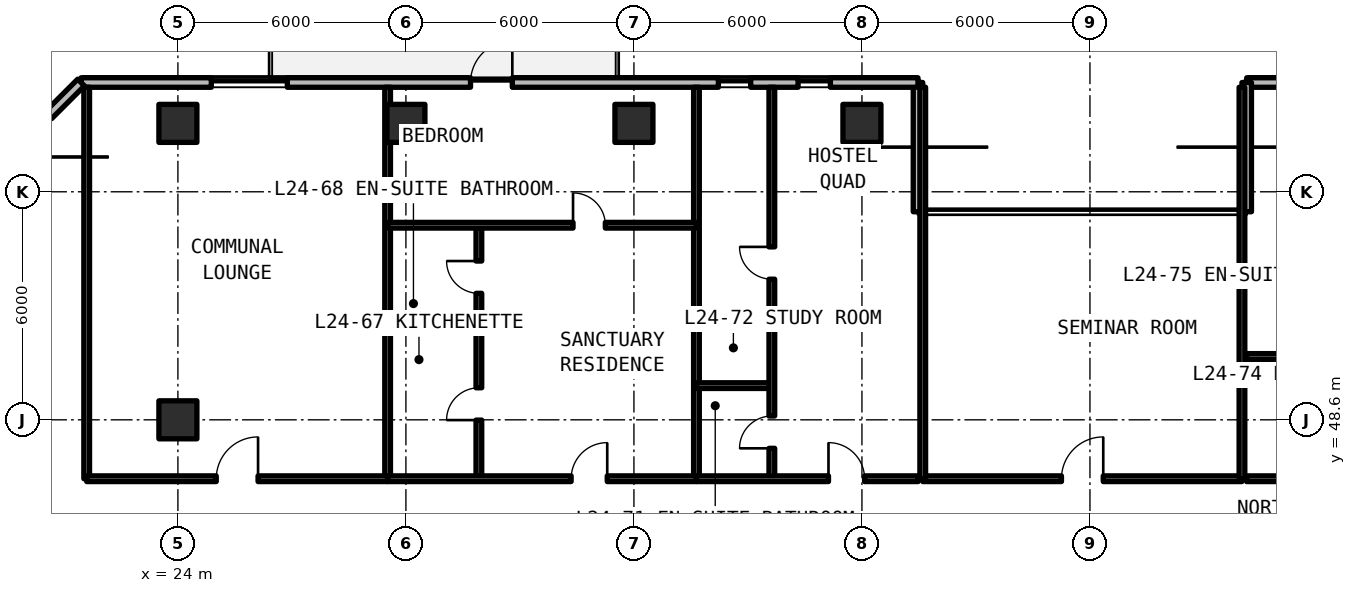
"""IFC4 building model, lengths in metres.
Left out: names, types, materials, properties, quantities, classifications, styles, units other than length and angle.
Written with IfcOpenShell. Run it as: python <this file> out.ifc"""

import sys

from ifc_helpers import new_model, si_unit, direction, frame, frame_2d, origin, origin_2d, place, context, subcontext, project, spatial, rectangle, extrude, element, fill, save


model = new_model("IFC4")
c1 = context("Model", 3, precision=1e-05, world=origin(), true_north=direction((0.0, 1.0)))
c2 = subcontext(c1, "Body", "Model", "MODEL_VIEW")
j1 = project(units=[si_unit("LENGTHUNIT", "METRE"), si_unit("PLANEANGLEUNIT", "RADIAN")], contexts=[c1])
p1 = place(None, origin())
s1 = spatial("IfcSite", under=j1, at=p1, CompositionType="ELEMENT")
p2 = place(p1, origin())
s2 = spatial("IfcBuilding", under=s1, at=p2, CompositionType="ELEMENT")
p3 = place(p2, frame((0.0, 0.0, 88.77)))
s3 = spatial("IfcBuildingStorey", under=s2, at=p3, CompositionType="ELEMENT", Elevation=88.77)
for number, where, z_axis, x_axis in (
    (1, (24.0, 48.6, 0.0), (0.0, 0.0, 1.0), (1.0, 0.0, 0.0)),
    (2, (24.0, 56.4, 0.0), (0.0, 0.0, 1.0), (1.0, 0.0, 0.0)),
    (3, (30.0, 56.4, 0.0), (0.0, 0.0, 1.0), (1.0, 0.0, 0.0)),
    (4, (36.0, 56.4, 0.0), (0.0, 0.0, 1.0), (1.0, 0.0, 0.0)),
    (5, (42.0, 56.4, 0.0), (0.0, 0.0, 1.0), (1.0, 0.0, 0.0)),
):
    element("IfcColumn", number, at=place(p3, frame(where, z_axis=z_axis, x_axis=x_axis)), inside=s3, PredefinedType="COLUMN", context=c2, shape_type="SweptSolid", body=[
        extrude(rectangle(XDim=1.0, YDim=1.0, at=origin_2d()), origin(), (0.0, 0.0, 1.0), 3.3),
    ])
p4 = place(p3, frame((96.148, 57.475, 0.0), z_axis=(0.0, 0.0, 1.0), x_axis=(-1.0, 0.0, 0.0)))
e6 = element("IfcWall", 6, at=p4, inside=s3, PredefinedType="SOLIDWALL", context=c2, shape_type="SweptSolid", body=[
    extrude(rectangle(XDim=44.023, YDim=0.25, at=frame_2d((22.012, 0.0))), origin(), (0.0, 0.0, 1.0), 3.08),
])
p5 = place(p4, frame((27.298, 0.0, 0.0)))
e7 = element("IfcOpeningElement", 7, at=p5, cuts=e6, PredefinedType="OPENING", context=c2, shape_type="SweptSolid", body=[
    extrude(rectangle(XDim=1.1, YDim=2.15, at=frame_2d((0.55, 1.075))), frame((0.0, 0.135, 0.0), z_axis=(0.0, -1.0, 0.0), x_axis=(1.0, 0.0, 0.0)), (0.0, 0.0, 1.0), 0.27),
])
p6 = place(p4, frame((19.948, 0.0, 0.0)))
e8 = element("IfcOpeningElement", 8, at=p6, cuts=e6, PredefinedType="OPENING", context=c2, shape_type="SweptSolid", body=[
    extrude(rectangle(XDim=1.1, YDim=2.15, at=frame_2d((0.55, 1.075))), frame((0.0, 0.135, 0.0), z_axis=(0.0, -1.0, 0.0), x_axis=(1.0, 0.0, 0.0)), (0.0, 0.0, 1.0), 0.27),
])
p7 = place(p4, frame((8.098, 0.0, 0.0)))
e9 = element("IfcOpeningElement", 9, at=p7, cuts=e6, PredefinedType="OPENING", context=c2, shape_type="SweptSolid", body=[
    extrude(rectangle(XDim=1.1, YDim=2.15, at=frame_2d((0.55, 1.075))), frame((0.0, 0.135, 0.0), z_axis=(0.0, -1.0, 0.0), x_axis=(1.0, 0.0, 0.0)), (0.0, 0.0, 1.0), 0.27),
])
p8 = place(p4, frame((39.336, 0.0, 0.78)))
e10 = element("IfcOpeningElement", 10, at=p8, cuts=e6, PredefinedType="OPENING", context=c2, shape_type="SweptSolid", body=[
    extrude(rectangle(XDim=2.0, YDim=1.66, at=frame_2d((1.0, 0.83))), frame((0.0, 0.135, 0.0), z_axis=(0.0, -1.0, 0.0), x_axis=(1.0, 0.0, 0.0)), (0.0, 0.0, 1.0), 0.27),
])
p9 = place(p4, frame((33.345, 0.0, 0.78)))
e11 = element("IfcOpeningElement", 11, at=p9, cuts=e6, PredefinedType="OPENING", context=c2, shape_type="SweptSolid", body=[
    extrude(rectangle(XDim=2.0, YDim=1.66, at=frame_2d((1.0, 0.83))), frame((0.0, 0.135, 0.0), z_axis=(0.0, -1.0, 0.0), x_axis=(1.0, 0.0, 0.0)), (0.0, 0.0, 1.0), 0.27),
])
p10 = place(p4, frame((13.044, 0.0, 0.78)))
e12 = element("IfcOpeningElement", 12, at=p10, cuts=e6, PredefinedType="OPENING", context=c2, shape_type="SweptSolid", body=[
    extrude(rectangle(XDim=1.4, YDim=1.65, at=frame_2d((0.7, 0.825))), frame((0.0, 0.135, 0.0), z_axis=(0.0, -1.0, 0.0), x_axis=(1.0, 0.0, 0.0)), (0.0, 0.0, 1.0), 0.27),
])
p11 = place(p4, frame((2.871, 0.0, 0.78)))
e13 = element("IfcOpeningElement", 13, at=p11, cuts=e6, PredefinedType="OPENING", context=c2, shape_type="SweptSolid", body=[
    extrude(rectangle(XDim=2.0, YDim=1.66, at=frame_2d((1.0, 0.83))), frame((0.0, 0.135, 0.0), z_axis=(0.0, -1.0, 0.0), x_axis=(1.0, 0.0, 0.0)), (0.0, 0.0, 1.0), 0.27),
])
for number, where, z_axis, x_axis in (
    (14, (52.125, 57.475, 0.0), (0.0, 0.0, 1.0), (0.0, -1.0, 0.0)),
    (15, (43.475, 54.075, 0.0), (0.0, 0.0, 1.0), (0.0, 1.0, 0.0)),
):
    element("IfcWall", number, at=place(p3, frame(where, z_axis=z_axis, x_axis=x_axis)), inside=s3, PredefinedType="SOLIDWALL", context=c2, shape_type="SweptSolid", body=[
        extrude(rectangle(XDim=3.4, YDim=0.25, at=frame_2d((1.7, 0.0))), origin(), (0.0, 0.0, 1.0), 3.08),
    ])
p12 = place(p3, frame((43.475, 57.475, 0.0), z_axis=(0.0, 0.0, 1.0), x_axis=(-1.0, 0.0, 0.0)))
e16 = element("IfcWall", 16, at=p12, inside=s3, PredefinedType="SOLIDWALL", context=c2, shape_type="SweptSolid", body=[
    extrude(rectangle(XDim=22.023, YDim=0.25, at=frame_2d((11.012, 0.0))), origin(), (0.0, 0.0, 1.0), 3.08),
])
p13 = place(p12, frame((10.675, 0.0, 0.0)))
e17 = element("IfcOpeningElement", 17, at=p13, cuts=e16, PredefinedType="OPENING", context=c2, shape_type="SweptSolid", body=[
    extrude(rectangle(XDim=1.1, YDim=2.15, at=frame_2d((0.55, 1.075))), frame((0.0, 0.135, 0.0), z_axis=(0.0, -1.0, 0.0), x_axis=(1.0, 0.0, 0.0)), (0.0, 0.0, 1.0), 0.27),
])
p14 = place(p12, frame((16.596, 0.0, 0.78)))
e18 = element("IfcOpeningElement", 18, at=p14, cuts=e16, PredefinedType="OPENING", context=c2, shape_type="SweptSolid", body=[
    extrude(rectangle(XDim=2.0, YDim=1.66, at=frame_2d((1.0, 0.83))), frame((0.0, 0.135, 0.0), z_axis=(0.0, -1.0, 0.0), x_axis=(1.0, 0.0, 0.0)), (0.0, 0.0, 1.0), 0.27),
])
p15 = place(p12, frame((4.403, 0.0, 0.78)))
e19 = element("IfcOpeningElement", 19, at=p15, cuts=e16, PredefinedType="OPENING", context=c2, shape_type="SweptSolid", body=[
    extrude(rectangle(XDim=0.85, YDim=1.65, at=frame_2d((0.425, 0.825))), frame((0.0, 0.135, 0.0), z_axis=(0.0, -1.0, 0.0), x_axis=(1.0, 0.0, 0.0)), (0.0, 0.0, 1.0), 0.27),
])
p16 = place(p12, frame((2.305, 0.0, 0.78)))
e20 = element("IfcOpeningElement", 20, at=p16, cuts=e16, PredefinedType="OPENING", context=c2, shape_type="SweptSolid", body=[
    extrude(rectangle(XDim=0.85, YDim=1.65, at=frame_2d((0.425, 0.825))), frame((0.0, 0.135, 0.0), z_axis=(0.0, -1.0, 0.0), x_axis=(1.0, 0.0, 0.0)), (0.0, 0.0, 1.0), 0.27),
])
p17 = place(p3, frame((21.452, 57.475, 0.0), z_axis=(0.0, 0.0, 1.0), x_axis=(-0.707106781187, -0.707106781187, 0.0)))
e21 = element("IfcWall", 21, at=p17, inside=s3, PredefinedType="SOLIDWALL", context=c2, shape_type="SweptSolid", body=[
    extrude(rectangle(XDim=5.836, YDim=0.25, at=frame_2d((2.918, 0.0))), origin(), (0.0, 0.0, 1.0), 3.08),
])
p18 = place(p17, frame((1.218, 0.0, 0.78)))
e22 = element("IfcOpeningElement", 22, at=p18, cuts=e21, PredefinedType="OPENING", context=c2, shape_type="SweptSolid", body=[
    extrude(rectangle(XDim=3.4, YDim=1.66, at=frame_2d((1.7, 0.83))), frame((0.0, 0.135, 0.0), z_axis=(0.0, -1.0, 0.0), x_axis=(1.0, 0.0, 0.0)), (0.0, 0.0, 1.0), 0.27),
])
p19 = place(p3, frame((43.6, 47.05, 0.0), z_axis=(0.0, 0.0, 1.0), x_axis=(1.0, 0.0, 0.0)))
e23 = element("IfcWall", 23, at=p19, inside=s3, PredefinedType="SOLIDWALL", context=c2, shape_type="SweptSolid", body=[
    extrude(rectangle(XDim=8.4, YDim=0.15, at=frame_2d((4.2, 0.0))), origin(), (0.0, 0.0, 1.0), 2.35),
])
p20 = place(p19, frame((3.65, 0.0, 0.0)))
e24 = element("IfcOpeningElement", 24, at=p20, cuts=e23, PredefinedType="OPENING", context=c2, shape_type="SweptSolid", body=[
    extrude(rectangle(XDim=1.1, YDim=2.15, at=frame_2d((0.55, 1.075))), frame((0.0, 0.085, 0.0), z_axis=(0.0, -1.0, 0.0), x_axis=(1.0, 0.0, 0.0)), (0.0, 0.0, 1.0), 0.17),
])
for number, where, z_axis, x_axis in (
    (25, (43.6, 47.05, 0.0), (0.0, 0.0, 1.0), (0.0, 1.0, 0.0)),
    (26, (52.0, 47.05, 0.0), (0.0, 0.0, 1.0), (0.0, 1.0, 0.0)),
    (27, (21.6, 47.05, 0.0), (0.0, 0.0, 1.0), (0.0, 1.0, 0.0)),
    (28, (29.519, 47.05, 0.0), (0.0, 0.0, 1.0), (0.0, 1.0, 0.0)),
):
    element("IfcWall", number, at=place(p3, frame(where, z_axis=z_axis, x_axis=x_axis)), inside=s3, PredefinedType="SOLIDWALL", context=c2, shape_type="SweptSolid", body=[
        extrude(rectangle(XDim=10.3, YDim=0.15, at=frame_2d((5.15, 0.0))), origin(), (0.0, 0.0, 1.0), 2.35),
    ])
p21 = place(p3, frame((21.6, 47.05, 0.0), z_axis=(0.0, 0.0, 1.0), x_axis=(1.0, 0.0, 0.0)))
e29 = element("IfcWall", 29, at=p21, inside=s3, PredefinedType="SOLIDWALL", context=c2, shape_type="SweptSolid", body=[
    extrude(rectangle(XDim=7.918, YDim=0.15, at=frame_2d((3.959, 0.0))), origin(), (0.0, 0.0, 1.0), 2.35),
])
p22 = place(p21, frame((3.409, 0.0, 0.0)))
e30 = element("IfcOpeningElement", 30, at=p22, cuts=e29, PredefinedType="OPENING", context=c2, shape_type="SweptSolid", body=[
    extrude(rectangle(XDim=1.1, YDim=2.15, at=frame_2d((0.55, 1.075))), frame((0.0, 0.085, 0.0), z_axis=(0.0, -1.0, 0.0), x_axis=(1.0, 0.0, 0.0)), (0.0, 0.0, 1.0), 0.17),
])
p23 = place(p3, frame((37.646, 47.05, 0.0), z_axis=(0.0, 0.0, 1.0), x_axis=(0.0, 1.0, 0.0)))
e31 = element("IfcWall", 31, at=p23, inside=s3, PredefinedType="SOLIDWALL", context=c2, shape_type="SweptSolid", body=[
    extrude(rectangle(XDim=10.3, YDim=0.15, at=frame_2d((5.15, 0.0))), origin(), (0.0, 0.0, 1.0), 2.35),
])
p24 = place(p3, frame((29.519, 50.985, 0.0), z_axis=(0.0, 0.0, 1.0), x_axis=(1.0, 0.0, 0.0)))
e32 = element("IfcWall", 32, at=p24, inside=s3, PredefinedType="PARTITIONING", context=c2, shape_type="SweptSolid", body=[
    extrude(rectangle(XDim=2.401, YDim=0.15, at=frame_2d((1.201, 0.0))), origin(), (0.0, 0.0, 1.0), 2.35),
])
p25 = place(p3, frame((31.92, 47.05, 0.0), z_axis=(0.0, 0.0, 1.0), x_axis=(0.0, 1.0, 0.0)))
e33 = element("IfcWall", 33, at=p25, inside=s3, PredefinedType="PARTITIONING", context=c2, shape_type="SweptSolid", body=[
    extrude(rectangle(XDim=6.67, YDim=0.15, at=frame_2d((3.335, 0.0))), origin(), (0.0, 0.0, 1.0), 2.35),
])
p26 = place(p25, frame((1.543, 0.0, 0.0)))
e34 = element("IfcOpeningElement", 34, at=p26, cuts=e33, PredefinedType="OPENING", context=c2, shape_type="SweptSolid", body=[
    extrude(rectangle(XDim=0.85, YDim=2.1, at=frame_2d((0.425, 1.05))), frame((0.0, 0.085, 0.0), z_axis=(0.0, -1.0, 0.0), x_axis=(1.0, 0.0, 0.0)), (0.0, 0.0, 1.0), 0.17),
])
p27 = place(p25, frame((4.878, 0.0, 0.0)))
e35 = element("IfcOpeningElement", 35, at=p27, cuts=e33, PredefinedType="OPENING", context=c2, shape_type="SweptSolid", body=[
    extrude(rectangle(XDim=0.85, YDim=2.1, at=frame_2d((0.425, 1.05))), frame((0.0, 0.085, 0.0), z_axis=(0.0, -1.0, 0.0), x_axis=(1.0, 0.0, 0.0)), (0.0, 0.0, 1.0), 0.17),
])
p28 = place(p3, frame((29.519, 53.72, 0.0), z_axis=(0.0, 0.0, 1.0), x_axis=(1.0, 0.0, 0.0)))
e36 = element("IfcWall", 36, at=p28, inside=s3, PredefinedType="PARTITIONING", context=c2, shape_type="SweptSolid", body=[
    extrude(rectangle(XDim=8.127, YDim=0.15, at=frame_2d((4.063, 0.0))), origin(), (0.0, 0.0, 1.0), 2.35),
])
p29 = place(p28, frame((4.879, 0.0, 0.0)))
e37 = element("IfcOpeningElement", 37, at=p29, cuts=e36, PredefinedType="OPENING", context=c2, shape_type="SweptSolid", body=[
    extrude(rectangle(XDim=0.85, YDim=2.1, at=frame_2d((0.425, 1.05))), frame((0.0, 0.085, 0.0), z_axis=(0.0, -1.0, 0.0), x_axis=(1.0, 0.0, 0.0)), (0.0, 0.0, 1.0), 0.17),
])
p30 = place(p3, frame((29.519, 47.05, 0.0), z_axis=(0.0, 0.0, 1.0), x_axis=(1.0, 0.0, 0.0)))
e38 = element("IfcWall", 38, at=p30, inside=s3, PredefinedType="SOLIDWALL", context=c2, shape_type="SweptSolid", body=[
    extrude(rectangle(XDim=8.127, YDim=0.15, at=frame_2d((4.063, 0.0))), origin(), (0.0, 0.0, 1.0), 2.35),
])
p31 = place(p30, frame((4.829, 0.0, 0.0)))
e39 = element("IfcOpeningElement", 39, at=p31, cuts=e38, PredefinedType="OPENING", context=c2, shape_type="SweptSolid", body=[
    extrude(rectangle(XDim=0.95, YDim=2.15, at=frame_2d((0.475, 1.075))), frame((0.0, 0.085, 0.0), z_axis=(0.0, -1.0, 0.0), x_axis=(1.0, 0.0, 0.0)), (0.0, 0.0, 1.0), 0.17),
])
p32 = place(p3, frame((37.646, 49.5, 0.0), z_axis=(0.0, 0.0, 1.0), x_axis=(1.0, 0.0, 0.0)))
e40 = element("IfcWall", 40, at=p32, inside=s3, PredefinedType="PARTITIONING", context=c2, shape_type="SweptSolid", body=[
    extrude(rectangle(XDim=1.984, YDim=0.15, at=frame_2d((0.992, 0.0))), origin(), (0.0, 0.0, 1.0), 2.35),
])
p33 = place(p3, frame((39.629, 47.05, 0.0), z_axis=(0.0, 0.0, 1.0), x_axis=(0.0, 1.0, 0.0)))
e41 = element("IfcWall", 41, at=p33, inside=s3, PredefinedType="PARTITIONING", context=c2, shape_type="SweptSolid", body=[
    extrude(rectangle(XDim=10.3, YDim=0.15, at=frame_2d((5.15, 0.0))), origin(), (0.0, 0.0, 1.0), 2.35),
])
p34 = place(p33, frame((0.8, 0.0, 0.0)))
e42 = element("IfcOpeningElement", 42, at=p34, cuts=e41, PredefinedType="OPENING", context=c2, shape_type="SweptSolid", body=[
    extrude(rectangle(XDim=0.85, YDim=2.1, at=frame_2d((0.425, 1.05))), frame((0.0, 0.085, 0.0), z_axis=(0.0, -1.0, 0.0), x_axis=(1.0, 0.0, 0.0)), (0.0, 0.0, 1.0), 0.17),
])
p35 = place(p33, frame((5.25, 0.0, 0.0)))
e43 = element("IfcOpeningElement", 43, at=p35, cuts=e41, PredefinedType="OPENING", context=c2, shape_type="SweptSolid", body=[
    extrude(rectangle(XDim=0.85, YDim=2.1, at=frame_2d((0.425, 1.05))), frame((0.0, 0.085, 0.0), z_axis=(0.0, -1.0, 0.0), x_axis=(1.0, 0.0, 0.0)), (0.0, 0.0, 1.0), 0.17),
])
p36 = place(p3, frame((37.646, 47.05, 0.0), z_axis=(0.0, 0.0, 1.0), x_axis=(1.0, 0.0, 0.0)))
e44 = element("IfcWall", 44, at=p36, inside=s3, PredefinedType="SOLIDWALL", context=c2, shape_type="SweptSolid", body=[
    extrude(rectangle(XDim=5.834, YDim=0.15, at=frame_2d((2.917, 0.0))), origin(), (0.0, 0.0, 1.0), 2.35),
])
p37 = place(p36, frame((3.474, 0.0, 0.0)))
e45 = element("IfcOpeningElement", 45, at=p37, cuts=e44, PredefinedType="OPENING", context=c2, shape_type="SweptSolid", body=[
    extrude(rectangle(XDim=0.95, YDim=2.15, at=frame_2d((0.475, 1.075))), frame((0.0, 0.085, 0.0), z_axis=(0.0, -1.0, 0.0), x_axis=(1.0, 0.0, 0.0)), (0.0, 0.0, 1.0), 0.17),
])
p38 = place(p3, frame((52.12, 50.267, 0.0), z_axis=(0.0, 0.0, 1.0), x_axis=(1.0, 0.0, 0.0)))
e46 = element("IfcWall", 46, at=p38, inside=s3, PredefinedType="PARTITIONING", context=c2, shape_type="SweptSolid", body=[
    extrude(rectangle(XDim=3.8, YDim=0.15, at=frame_2d((1.9, 0.0))), origin(), (0.0, 0.0, 1.0), 2.35),
])
p39 = place(p3, frame((52.12, 52.502, 0.0), z_axis=(0.0, 0.0, 1.0), x_axis=(1.0, 0.0, 0.0)))
e47 = element("IfcWall", 47, at=p39, inside=s3, PredefinedType="PARTITIONING", context=c2, shape_type="SweptSolid", body=[
    extrude(rectangle(XDim=11.701, YDim=0.15, at=frame_2d((5.851, 0.0))), origin(), (0.0, 0.0, 1.0), 2.35),
])
p40 = place(p39, frame((4.517, 0.0, 0.0)))
e48 = element("IfcOpeningElement", 48, at=p40, cuts=e47, PredefinedType="OPENING", context=c2, shape_type="SweptSolid", body=[
    extrude(rectangle(XDim=0.85, YDim=2.1, at=frame_2d((0.425, 1.05))), frame((0.0, 0.085, 0.0), z_axis=(0.0, -1.0, 0.0), x_axis=(1.0, 0.0, 0.0)), (0.0, 0.0, 1.0), 0.17),
])
p41 = place(p39, frame((8.468, 0.0, 0.0)))
e49 = element("IfcOpeningElement", 49, at=p41, cuts=e47, PredefinedType="OPENING", context=c2, shape_type="SweptSolid", body=[
    extrude(rectangle(XDim=0.85, YDim=2.1, at=frame_2d((0.425, 1.05))), frame((0.0, 0.085, 0.0), z_axis=(0.0, -1.0, 0.0), x_axis=(1.0, 0.0, 0.0)), (0.0, 0.0, 1.0), 0.17),
])
p42 = place(p3, frame((52.12, 47.05, 0.0), z_axis=(0.0, 0.0, 1.0), x_axis=(1.0, 0.0, 0.0)))
e50 = element("IfcWall", 50, at=p42, inside=s3, PredefinedType="SOLIDWALL", context=c2, shape_type="SweptSolid", body=[
    extrude(rectangle(XDim=11.701, YDim=0.15, at=frame_2d((5.851, 0.0))), origin(), (0.0, 0.0, 1.0), 2.35),
])
p43 = place(p42, frame((7.316, 0.0, 0.0)))
e51 = element("IfcOpeningElement", 51, at=p43, cuts=e50, PredefinedType="OPENING", context=c2, shape_type="SweptSolid", body=[
    extrude(rectangle(XDim=0.95, YDim=2.15, at=frame_2d((0.475, 1.075))), frame((0.0, 0.085, 0.0), z_axis=(0.0, -1.0, 0.0), x_axis=(1.0, 0.0, 0.0)), (0.0, 0.0, 1.0), 0.17),
])
p44 = place(p13, frame((1.1, 0.0, 0.0), z_axis=(0.0, 0.0, 1.0), x_axis=(-1.0, 0.0, 0.0)))
e52 = element("IfcDoor", 52, at=p44, inside=s3, OperationType="SINGLE_SWING_RIGHT", PredefinedType="DOOR", context=c2, shape_type="SweptSolid", body=[
    extrude(rectangle(XDim=1.1, YDim=2.15, at=frame_2d((0.55, 1.075))), frame((0.0, 0.025, 0.0), z_axis=(0.0, -1.0, 0.0), x_axis=(1.0, 0.0, 0.0)), (0.0, 0.0, 1.0), 0.05),
])
fill(e17, e52)
p45 = place(p14, origin())
e53 = element("IfcWindow", 53, at=p45, inside=s3, PartitioningType="SINGLE_PANEL", PredefinedType="WINDOW", context=c2, shape_type="SweptSolid", body=[
    extrude(rectangle(XDim=2.0, YDim=1.66, at=frame_2d((1.0, 0.83))), frame((0.0, 0.03, 0.0), z_axis=(0.0, -1.0, 0.0), x_axis=(1.0, 0.0, 0.0)), (0.0, 0.0, 1.0), 0.06),
])
fill(e18, e53)
p46 = place(p15, origin())
e54 = element("IfcWindow", 54, at=p46, inside=s3, PartitioningType="SINGLE_PANEL", PredefinedType="WINDOW", context=c2, shape_type="SweptSolid", body=[
    extrude(rectangle(XDim=0.85, YDim=1.65, at=frame_2d((0.425, 0.825))), frame((0.0, 0.03, 0.0), z_axis=(0.0, -1.0, 0.0), x_axis=(1.0, 0.0, 0.0)), (0.0, 0.0, 1.0), 0.06),
])
fill(e19, e54)
p47 = place(p16, origin())
e55 = element("IfcWindow", 55, at=p47, inside=s3, PartitioningType="SINGLE_PANEL", PredefinedType="WINDOW", context=c2, shape_type="SweptSolid", body=[
    extrude(rectangle(XDim=0.85, YDim=1.65, at=frame_2d((0.425, 0.825))), frame((0.0, 0.03, 0.0), z_axis=(0.0, -1.0, 0.0), x_axis=(1.0, 0.0, 0.0)), (0.0, 0.0, 1.0), 0.06),
])
fill(e20, e55)
p48 = place(p20, origin())
e56 = element("IfcDoor", 56, at=p48, inside=s3, OperationType="SINGLE_SWING_RIGHT", PredefinedType="DOOR", context=c2, shape_type="SweptSolid", body=[
    extrude(rectangle(XDim=1.1, YDim=2.15, at=frame_2d((0.55, 1.075))), frame((0.0, 0.025, 0.0), z_axis=(0.0, -1.0, 0.0), x_axis=(1.0, 0.0, 0.0)), (0.0, 0.0, 1.0), 0.05),
])
fill(e24, e56)
p49 = place(p22, origin())
e57 = element("IfcDoor", 57, at=p49, inside=s3, OperationType="SINGLE_SWING_RIGHT", PredefinedType="DOOR", context=c2, shape_type="SweptSolid", body=[
    extrude(rectangle(XDim=1.1, YDim=2.15, at=frame_2d((0.55, 1.075))), frame((0.0, 0.025, 0.0), z_axis=(0.0, -1.0, 0.0), x_axis=(1.0, 0.0, 0.0)), (0.0, 0.0, 1.0), 0.05),
])
fill(e30, e57)
p50 = place(p26, origin())
e58 = element("IfcDoor", 58, at=p50, inside=s3, OperationType="SINGLE_SWING_LEFT", PredefinedType="DOOR", context=c2, shape_type="SweptSolid", body=[
    extrude(rectangle(XDim=0.85, YDim=2.1, at=frame_2d((0.425, 1.05))), frame((0.0, 0.025, 0.0), z_axis=(0.0, -1.0, 0.0), x_axis=(1.0, 0.0, 0.0)), (0.0, 0.0, 1.0), 0.05),
])
fill(e34, e58)
p51 = place(p27, origin())
e59 = element("IfcDoor", 59, at=p51, inside=s3, OperationType="SINGLE_SWING_RIGHT", PredefinedType="DOOR", context=c2, shape_type="SweptSolid", body=[
    extrude(rectangle(XDim=0.85, YDim=2.1, at=frame_2d((0.425, 1.05))), frame((0.0, 0.025, 0.0), z_axis=(0.0, -1.0, 0.0), x_axis=(1.0, 0.0, 0.0)), (0.0, 0.0, 1.0), 0.05),
])
fill(e35, e59)
p52 = place(p29, origin())
e60 = element("IfcDoor", 60, at=p52, inside=s3, OperationType="SINGLE_SWING_LEFT", PredefinedType="DOOR", context=c2, shape_type="SweptSolid", body=[
    extrude(rectangle(XDim=0.85, YDim=2.1, at=frame_2d((0.425, 1.05))), frame((0.0, 0.025, 0.0), z_axis=(0.0, -1.0, 0.0), x_axis=(1.0, 0.0, 0.0)), (0.0, 0.0, 1.0), 0.05),
])
fill(e37, e60)
p53 = place(p31, origin())
e61 = element("IfcDoor", 61, at=p53, inside=s3, OperationType="SINGLE_SWING_RIGHT", PredefinedType="DOOR", context=c2, shape_type="SweptSolid", body=[
    extrude(rectangle(XDim=0.95, YDim=2.15, at=frame_2d((0.475, 1.075))), frame((0.0, 0.025, 0.0), z_axis=(0.0, -1.0, 0.0), x_axis=(1.0, 0.0, 0.0)), (0.0, 0.0, 1.0), 0.05),
])
fill(e39, e61)
p54 = place(p34, origin())
e62 = element("IfcDoor", 62, at=p54, inside=s3, OperationType="SINGLE_SWING_LEFT", PredefinedType="DOOR", context=c2, shape_type="SweptSolid", body=[
    extrude(rectangle(XDim=0.85, YDim=2.1, at=frame_2d((0.425, 1.05))), frame((0.0, 0.025, 0.0), z_axis=(0.0, -1.0, 0.0), x_axis=(1.0, 0.0, 0.0)), (0.0, 0.0, 1.0), 0.05),
])
fill(e42, e62)
p55 = place(p35, origin())
e63 = element("IfcDoor", 63, at=p55, inside=s3, OperationType="SINGLE_SWING_RIGHT", PredefinedType="DOOR", context=c2, shape_type="SweptSolid", body=[
    extrude(rectangle(XDim=0.85, YDim=2.1, at=frame_2d((0.425, 1.05))), frame((0.0, 0.025, 0.0), z_axis=(0.0, -1.0, 0.0), x_axis=(1.0, 0.0, 0.0)), (0.0, 0.0, 1.0), 0.05),
])
fill(e43, e63)
p56 = place(p37, origin())
e64 = element("IfcDoor", 64, at=p56, inside=s3, OperationType="SINGLE_SWING_LEFT", PredefinedType="DOOR", context=c2, shape_type="SweptSolid", body=[
    extrude(rectangle(XDim=0.95, YDim=2.15, at=frame_2d((0.475, 1.075))), frame((0.0, 0.025, 0.0), z_axis=(0.0, -1.0, 0.0), x_axis=(1.0, 0.0, 0.0)), (0.0, 0.0, 1.0), 0.05),
])
fill(e45, e64)
save(model, sys.argv[1])
